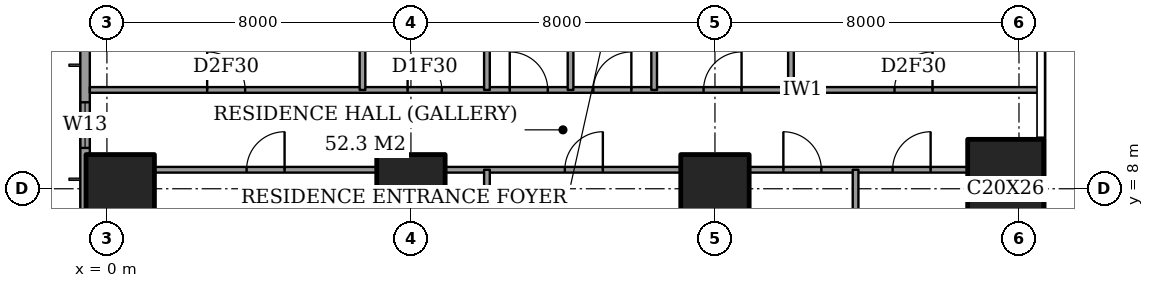
"""IFC4 building model, lengths in metres.
Left out: names, types, materials, properties, quantities, classifications, styles, units other than length and angle.
Written with IfcOpenShell. Run it as: python <this file> out.ifc"""

import sys

from ifc_helpers import new_model, si_unit, direction, frame, frame_2d, origin, origin_2d, place, context, subcontext, project, spatial, rectangle, extrude, element, fill, save


model = new_model("IFC4")
c1 = context("Model", 3, precision=1e-05, world=origin(), true_north=direction((0.0, 1.0)))
c2 = subcontext(c1, "Body", "Model", "MODEL_VIEW")
j1 = project(units=[si_unit("LENGTHUNIT", "METRE"), si_unit("PLANEANGLEUNIT", "RADIAN")], contexts=[c1])
p1 = place(None, origin())
s1 = spatial("IfcSite", under=j1, at=p1, CompositionType="ELEMENT")
p2 = place(p1, origin())
s2 = spatial("IfcBuilding", under=s1, at=p2, CompositionType="ELEMENT")
p3 = place(p2, frame((0.0, 0.0, 207.4)))
s3 = spatial("IfcBuildingStorey", under=s2, at=p3, CompositionType="ELEMENT", Elevation=207.4)
for number, where, z_axis, x_axis in (
    (1, (0.35, 8.0, 0.0), (0.0, 0.0, 1.0), (1.0, 0.0, 0.0)),
    (2, (8.0, 8.0, 0.0), (0.0, 0.0, 1.0), (1.0, 0.0, 0.0)),
    (3, (16.0, 8.0, 0.0), (0.0, 0.0, 1.0), (1.0, 0.0, 0.0)),
):
    element("IfcColumn", number, at=place(p3, frame(where, z_axis=z_axis, x_axis=x_axis)), inside=s3, PredefinedType="COLUMN", context=c2, shape_type="SweptSolid", body=[
        extrude(rectangle(XDim=1.8, YDim=1.8, at=origin_2d()), origin(), (0.0, 0.0, 1.0), 3.6),
    ])
p4 = place(p3, frame((23.65, 8.0, 0.0), z_axis=(0.0, 0.0, 1.0), x_axis=(1.0, 0.0, 0.0)))
e4 = element("IfcColumn", 4, at=p4, inside=s3, PredefinedType="COLUMN", context=c2, shape_type="SweptSolid", body=[
    extrude(rectangle(XDim=2.0, YDim=2.6, at=origin_2d()), origin(), (0.0, 0.0, 1.0), 3.6),
])
p5 = place(p3, frame((-0.575, 44.825, 0.0), z_axis=(0.0, 0.0, 1.0), x_axis=(0.0, -1.0, 0.0)))
e5 = element("IfcWall", 5, at=p5, inside=s3, PredefinedType="SOLIDWALL", context=c2, shape_type="SweptSolid", body=[
    extrude(rectangle(XDim=41.65, YDim=0.25, at=frame_2d((20.825, 0.0))), origin(), (0.0, 0.0, 1.0), 3.6),
])
p6 = place(p5, frame((0.825, 0.0, 0.2)))
e6 = element("IfcOpeningElement", 6, at=p6, cuts=e5, PredefinedType="OPENING", context=c2, shape_type="SweptSolid", body=[
    extrude(rectangle(XDim=2.4, YDim=2.4, at=frame_2d((1.2, 1.2))), frame((0.0, 0.135, 0.0), z_axis=(0.0, -1.0, 0.0), x_axis=(1.0, 0.0, 0.0)), (0.0, 0.0, 1.0), 0.27),
])
p7 = place(p5, frame((6.075, 0.0, 0.2)))
e7 = element("IfcOpeningElement", 7, at=p7, cuts=e5, PredefinedType="OPENING", context=c2, shape_type="SweptSolid", body=[
    extrude(rectangle(XDim=1.2, YDim=2.4, at=frame_2d((0.6, 1.2))), frame((0.0, 0.135, 0.0), z_axis=(0.0, -1.0, 0.0), x_axis=(1.0, 0.0, 0.0)), (0.0, 0.0, 1.0), 0.27),
])
p8 = place(p5, frame((8.575, 0.0, 0.2)))
e8 = element("IfcOpeningElement", 8, at=p8, cuts=e5, PredefinedType="OPENING", context=c2, shape_type="SweptSolid", body=[
    extrude(rectangle(XDim=2.4, YDim=2.4, at=frame_2d((1.2, 1.2))), frame((0.0, 0.135, 0.0), z_axis=(0.0, -1.0, 0.0), x_axis=(1.0, 0.0, 0.0)), (0.0, 0.0, 1.0), 0.27),
])
p9 = place(p5, frame((15.675, 0.0, 0.2)))
e9 = element("IfcOpeningElement", 9, at=p9, cuts=e5, PredefinedType="OPENING", context=c2, shape_type="SweptSolid", body=[
    extrude(rectangle(XDim=2.4, YDim=2.4, at=frame_2d((1.2, 1.2))), frame((0.0, 0.135, 0.0), z_axis=(0.0, -1.0, 0.0), x_axis=(1.0, 0.0, 0.0)), (0.0, 0.0, 1.0), 0.27),
])
p10 = place(p5, frame((23.575, 0.0, 0.2)))
e10 = element("IfcOpeningElement", 10, at=p10, cuts=e5, PredefinedType="OPENING", context=c2, shape_type="SweptSolid", body=[
    extrude(rectangle(XDim=2.4, YDim=2.4, at=frame_2d((1.2, 1.2))), frame((0.0, 0.135, 0.0), z_axis=(0.0, -1.0, 0.0), x_axis=(1.0, 0.0, 0.0)), (0.0, 0.0, 1.0), 0.27),
])
p11 = place(p5, frame((30.775, 0.0, 0.2)))
e11 = element("IfcOpeningElement", 11, at=p11, cuts=e5, PredefinedType="OPENING", context=c2, shape_type="SweptSolid", body=[
    extrude(rectangle(XDim=2.4, YDim=2.4, at=frame_2d((1.2, 1.2))), frame((0.0, 0.135, 0.0), z_axis=(0.0, -1.0, 0.0), x_axis=(1.0, 0.0, 0.0)), (0.0, 0.0, 1.0), 0.27),
])
p12 = place(p5, frame((34.55, 0.0, 0.2)))
e12 = element("IfcOpeningElement", 12, at=p12, cuts=e5, PredefinedType="OPENING", context=c2, shape_type="SweptSolid", body=[
    extrude(rectangle(XDim=1.2, YDim=2.4, at=frame_2d((0.6, 1.2))), frame((0.0, 0.135, 0.0), z_axis=(0.0, -1.0, 0.0), x_axis=(1.0, 0.0, 0.0)), (0.0, 0.0, 1.0), 0.27),
])
p13 = place(p5, frame((38.425, 0.0, 0.2)))
e13 = element("IfcOpeningElement", 13, at=p13, cuts=e5, PredefinedType="OPENING", context=c2, shape_type="SweptSolid", body=[
    extrude(rectangle(XDim=2.4, YDim=2.4, at=frame_2d((1.2, 1.2))), frame((0.0, 0.135, 0.0), z_axis=(0.0, -1.0, 0.0), x_axis=(1.0, 0.0, 0.0)), (0.0, 0.0, 1.0), 0.27),
])
p14 = place(p3, frame((1.25, 8.5, 0.0), z_axis=(0.0, 0.0, 1.0), x_axis=(1.0, 0.0, 0.0)))
e14 = element("IfcWall", 14, at=p14, inside=s3, PredefinedType="PARTITIONING", context=c2, shape_type="SweptSolid", body=[
    extrude(rectangle(XDim=5.85, YDim=0.15, at=frame_2d((2.925, 0.0))), origin(), (0.0, 0.0, 1.0), 3.35),
])
p15 = place(p14, frame((2.425, 0.0, 0.0)))
e15 = element("IfcOpeningElement", 15, at=p15, cuts=e14, PredefinedType="OPENING", context=c2, shape_type="SweptSolid", body=[
    extrude(rectangle(XDim=1.0, YDim=2.1, at=frame_2d((0.5, 1.05))), frame((0.0, 0.085, 0.0), z_axis=(0.0, -1.0, 0.0), x_axis=(1.0, 0.0, 0.0)), (0.0, 0.0, 1.0), 0.17),
])
p16 = place(p3, frame((8.9, 8.5, 0.0), z_axis=(0.0, 0.0, 1.0), x_axis=(1.0, 0.0, 0.0)))
e16 = element("IfcWall", 16, at=p16, inside=s3, PredefinedType="PARTITIONING", context=c2, shape_type="SweptSolid", body=[
    extrude(rectangle(XDim=6.2, YDim=0.15, at=frame_2d((3.1, 0.0))), origin(), (0.0, 0.0, 1.0), 3.35),
])
p17 = place(p16, frame((3.15, 0.0, 0.0)))
e17 = element("IfcOpeningElement", 17, at=p17, cuts=e16, PredefinedType="OPENING", context=c2, shape_type="SweptSolid", body=[
    extrude(rectangle(XDim=1.0, YDim=2.1, at=frame_2d((0.5, 1.05))), frame((0.0, 0.085, 0.0), z_axis=(0.0, -1.0, 0.0), x_axis=(1.0, 0.0, 0.0)), (0.0, 0.0, 1.0), 0.17),
])
p18 = place(p3, frame((16.9, 8.5, 0.0), z_axis=(0.0, 0.0, 1.0), x_axis=(1.0, 0.0, 0.0)))
e18 = element("IfcWall", 18, at=p18, inside=s3, PredefinedType="PARTITIONING", context=c2, shape_type="SweptSolid", body=[
    extrude(rectangle(XDim=5.75, YDim=0.15, at=frame_2d((2.875, 0.0))), origin(), (0.0, 0.0, 1.0), 3.35),
])
p19 = place(p18, frame((0.9, 0.0, 0.0)))
e19 = element("IfcOpeningElement", 19, at=p19, cuts=e18, PredefinedType="OPENING", context=c2, shape_type="SweptSolid", body=[
    extrude(rectangle(XDim=1.0, YDim=2.1, at=frame_2d((0.5, 1.05))), frame((0.0, 0.085, 0.0), z_axis=(0.0, -1.0, 0.0), x_axis=(1.0, 0.0, 0.0)), (0.0, 0.0, 1.0), 0.17),
])
p20 = place(p18, frame((3.775, 0.0, 0.0)))
e20 = element("IfcOpeningElement", 20, at=p20, cuts=e18, PredefinedType="OPENING", context=c2, shape_type="SweptSolid", body=[
    extrude(rectangle(XDim=1.0, YDim=2.1, at=frame_2d((0.5, 1.05))), frame((0.0, 0.085, 0.0), z_axis=(0.0, -1.0, 0.0), x_axis=(1.0, 0.0, 0.0)), (0.0, 0.0, 1.0), 0.17),
])
p21 = place(p3, frame((-0.45, 10.6, 0.0), z_axis=(0.0, 0.0, 1.0), x_axis=(1.0, 0.0, 0.0)))
e21 = element("IfcWall", 21, at=p21, inside=s3, PredefinedType="PARTITIONING", context=c2, shape_type="SweptSolid", body=[
    extrude(rectangle(XDim=25.011, YDim=0.15, at=frame_2d((12.505, 0.0))), origin(), (0.0, 0.0, 1.0), 3.35),
])
p22 = place(p21, frame((13.25, 0.0, 0.0)))
e22 = element("IfcOpeningElement", 22, at=p22, cuts=e21, PredefinedType="OPENING", context=c2, shape_type="SweptSolid", body=[
    extrude(rectangle(XDim=1.0, YDim=2.1, at=frame_2d((0.5, 1.05))), frame((0.0, 0.085, 0.0), z_axis=(0.0, -1.0, 0.0), x_axis=(1.0, 0.0, 0.0)), (0.0, 0.0, 1.0), 0.17),
])
p23 = place(p21, frame((3.087, 0.0, 0.0)))
e23 = element("IfcOpeningElement", 23, at=p23, cuts=e21, PredefinedType="OPENING", context=c2, shape_type="SweptSolid", body=[
    extrude(rectangle(XDim=1.0, YDim=2.1, at=frame_2d((0.5, 1.05))), frame((0.0, 0.085, 0.0), z_axis=(0.0, -1.0, 0.0), x_axis=(1.0, 0.0, 0.0)), (0.0, 0.0, 1.0), 0.17),
])
p24 = place(p21, frame((8.363, 0.0, 0.0)))
e24 = element("IfcOpeningElement", 24, at=p24, cuts=e21, PredefinedType="OPENING", context=c2, shape_type="SweptSolid", body=[
    extrude(rectangle(XDim=0.9, YDim=2.1, at=frame_2d((0.45, 1.05))), frame((0.0, 0.085, 0.0), z_axis=(0.0, -1.0, 0.0), x_axis=(1.0, 0.0, 0.0)), (0.0, 0.0, 1.0), 0.17),
])
p25 = place(p21, frame((11.05, 0.0, 0.0)))
e25 = element("IfcOpeningElement", 25, at=p25, cuts=e21, PredefinedType="OPENING", context=c2, shape_type="SweptSolid", body=[
    extrude(rectangle(XDim=1.0, YDim=2.1, at=frame_2d((0.5, 1.05))), frame((0.0, 0.085, 0.0), z_axis=(0.0, -1.0, 0.0), x_axis=(1.0, 0.0, 0.0)), (0.0, 0.0, 1.0), 0.17),
])
p26 = place(p21, frame((16.15, 0.0, 0.0)))
e26 = element("IfcOpeningElement", 26, at=p26, cuts=e21, PredefinedType="OPENING", context=c2, shape_type="SweptSolid", body=[
    extrude(rectangle(XDim=1.0, YDim=2.1, at=frame_2d((0.5, 1.05))), frame((0.0, 0.085, 0.0), z_axis=(0.0, -1.0, 0.0), x_axis=(1.0, 0.0, 0.0)), (0.0, 0.0, 1.0), 0.17),
])
p27 = place(p21, frame((21.175, 0.0, 0.0)))
e27 = element("IfcOpeningElement", 27, at=p27, cuts=e21, PredefinedType="OPENING", context=c2, shape_type="SweptSolid", body=[
    extrude(rectangle(XDim=1.0, YDim=2.1, at=frame_2d((0.5, 1.05))), frame((0.0, 0.085, 0.0), z_axis=(0.0, -1.0, 0.0), x_axis=(1.0, 0.0, 0.0)), (0.0, 0.0, 1.0), 0.17),
])
p28 = place(p3, frame((6.725, 10.6, 0.0), z_axis=(0.0, 0.0, 1.0), x_axis=(0.0, 1.0, 0.0)))
e28 = element("IfcWall", 28, at=p28, inside=s3, PredefinedType="PARTITIONING", context=c2, shape_type="SweptSolid", body=[
    extrude(rectangle(XDim=4.2, YDim=0.15, at=frame_2d((2.1, 0.0))), origin(), (0.0, 0.0, 1.0), 3.35),
])
p29 = place(p3, frame((10.0, -0.45, 0.0), z_axis=(0.0, 0.0, 1.0), x_axis=(0.0, 1.0, 0.0)))
e29 = element("IfcWall", 29, at=p29, inside=s3, PredefinedType="PARTITIONING", context=c2, shape_type="SweptSolid", body=[
    extrude(rectangle(XDim=8.95, YDim=0.15, at=frame_2d((4.475, 0.0))), origin(), (0.0, 0.0, 1.0), 3.35),
])
p30 = place(p3, frame((10.0, 10.6, 0.0), z_axis=(0.0, 0.0, 1.0), x_axis=(0.0, 1.0, 0.0)))
e30 = element("IfcWall", 30, at=p30, inside=s3, PredefinedType="PARTITIONING", context=c2, shape_type="SweptSolid", body=[
    extrude(rectangle(XDim=11.0, YDim=0.15, at=frame_2d((5.5, 0.0))), origin(), (0.0, 0.0, 1.0), 3.35),
])
p31 = place(p30, frame((8.2, 0.0, 0.0)))
e31 = element("IfcOpeningElement", 31, at=p31, cuts=e30, PredefinedType="OPENING", context=c2, shape_type="SweptSolid", body=[
    extrude(rectangle(XDim=1.0, YDim=2.1, at=frame_2d((0.5, 1.05))), frame((0.0, 0.085, 0.0), z_axis=(0.0, -1.0, 0.0), x_axis=(1.0, 0.0, 0.0)), (0.0, 0.0, 1.0), 0.17),
])
for number, where, z_axis, x_axis in (
    (32, (12.2, 10.6, 0.0), (0.0, 0.0, 1.0), (0.0, 1.0, 0.0)),
    (33, (14.4, 10.6, 0.0), (0.0, 0.0, 1.0), (0.0, 1.0, 0.0)),
    (34, (18.0, 10.6, 0.0), (0.0, 0.0, 1.0), (0.0, 1.0, 0.0)),
):
    element("IfcWall", number, at=place(p3, frame(where, z_axis=z_axis, x_axis=x_axis)), inside=s3, PredefinedType="PARTITIONING", context=c2, shape_type="SweptSolid", body=[
        extrude(rectangle(XDim=6.4, YDim=0.15, at=frame_2d((3.2, 0.0))), origin(), (0.0, 0.0, 1.0), 3.35),
    ])
p32 = place(p3, frame((19.7, -0.45, 0.0), z_axis=(0.0, 0.0, 1.0), x_axis=(0.0, 1.0, 0.0)))
e35 = element("IfcWall", 35, at=p32, inside=s3, PredefinedType="PARTITIONING", context=c2, shape_type="SweptSolid", body=[
    extrude(rectangle(XDim=8.95, YDim=0.15, at=frame_2d((4.475, 0.0))), origin(), (0.0, 0.0, 1.0), 3.35),
])
p33 = place(p12, origin())
e36 = element("IfcWindow", 36, at=p33, inside=s3, PartitioningType="SINGLE_PANEL", PredefinedType="WINDOW", context=c2, shape_type="SweptSolid", body=[
    extrude(rectangle(XDim=1.2, YDim=2.4, at=frame_2d((0.6, 1.2))), frame((0.0, 0.03, 0.0), z_axis=(0.0, -1.0, 0.0), x_axis=(1.0, 0.0, 0.0)), (0.0, 0.0, 1.0), 0.06),
])
fill(e12, e36)
p34 = place(p15, origin())
e37 = element("IfcDoor", 37, at=p34, inside=s3, OperationType="SINGLE_SWING_LEFT", PredefinedType="DOOR", context=c2, shape_type="SweptSolid", body=[
    extrude(rectangle(XDim=1.0, YDim=2.1, at=frame_2d((0.5, 1.05))), frame((0.0, 0.025, 0.0), z_axis=(0.0, -1.0, 0.0), x_axis=(1.0, 0.0, 0.0)), (0.0, 0.0, 1.0), 0.05),
])
fill(e15, e37)
p35 = place(p17, origin())
e38 = element("IfcDoor", 38, at=p35, inside=s3, OperationType="SINGLE_SWING_LEFT", PredefinedType="DOOR", context=c2, shape_type="SweptSolid", body=[
    extrude(rectangle(XDim=1.0, YDim=2.1, at=frame_2d((0.5, 1.05))), frame((0.0, 0.025, 0.0), z_axis=(0.0, -1.0, 0.0), x_axis=(1.0, 0.0, 0.0)), (0.0, 0.0, 1.0), 0.05),
])
fill(e17, e38)
p36 = place(p19, origin())
e39 = element("IfcDoor", 39, at=p36, inside=s3, OperationType="SINGLE_SWING_RIGHT", PredefinedType="DOOR", context=c2, shape_type="SweptSolid", body=[
    extrude(rectangle(XDim=1.0, YDim=2.1, at=frame_2d((0.5, 1.05))), frame((0.0, 0.025, 0.0), z_axis=(0.0, -1.0, 0.0), x_axis=(1.0, 0.0, 0.0)), (0.0, 0.0, 1.0), 0.05),
])
fill(e19, e39)
p37 = place(p20, origin())
e40 = element("IfcDoor", 40, at=p37, inside=s3, OperationType="SINGLE_SWING_LEFT", PredefinedType="DOOR", context=c2, shape_type="SweptSolid", body=[
    extrude(rectangle(XDim=1.0, YDim=2.1, at=frame_2d((0.5, 1.05))), frame((0.0, 0.025, 0.0), z_axis=(0.0, -1.0, 0.0), x_axis=(1.0, 0.0, 0.0)), (0.0, 0.0, 1.0), 0.05),
])
fill(e20, e40)
p38 = place(p22, origin())
e41 = element("IfcDoor", 41, at=p38, inside=s3, OperationType="SINGLE_SWING_LEFT", PredefinedType="DOOR", context=c2, shape_type="SweptSolid", body=[
    extrude(rectangle(XDim=1.0, YDim=2.1, at=frame_2d((0.5, 1.05))), frame((0.0, 0.025, 0.0), z_axis=(0.0, -1.0, 0.0), x_axis=(1.0, 0.0, 0.0)), (0.0, 0.0, 1.0), 0.05),
])
fill(e22, e41)
p39 = place(p23, origin())
e42 = element("IfcDoor", 42, at=p39, inside=s3, OperationType="SINGLE_SWING_RIGHT", PredefinedType="DOOR", context=c2, shape_type="SweptSolid", body=[
    extrude(rectangle(XDim=1.0, YDim=2.1, at=frame_2d((0.5, 1.05))), frame((0.0, 0.025, 0.0), z_axis=(0.0, -1.0, 0.0), x_axis=(1.0, 0.0, 0.0)), (0.0, 0.0, 1.0), 0.05),
])
fill(e23, e42)
p40 = place(p24, origin())
e43 = element("IfcDoor", 43, at=p40, inside=s3, OperationType="SINGLE_SWING_RIGHT", PredefinedType="DOOR", context=c2, shape_type="SweptSolid", body=[
    extrude(rectangle(XDim=0.9, YDim=2.1, at=frame_2d((0.45, 1.05))), frame((0.0, 0.025, 0.0), z_axis=(0.0, -1.0, 0.0), x_axis=(1.0, 0.0, 0.0)), (0.0, 0.0, 1.0), 0.05),
])
fill(e24, e43)
p41 = place(p25, origin())
e44 = element("IfcDoor", 44, at=p41, inside=s3, OperationType="SINGLE_SWING_RIGHT", PredefinedType="DOOR", context=c2, shape_type="SweptSolid", body=[
    extrude(rectangle(XDim=1.0, YDim=2.1, at=frame_2d((0.5, 1.05))), frame((0.0, 0.025, 0.0), z_axis=(0.0, -1.0, 0.0), x_axis=(1.0, 0.0, 0.0)), (0.0, 0.0, 1.0), 0.05),
])
fill(e25, e44)
p42 = place(p26, origin())
e45 = element("IfcDoor", 45, at=p42, inside=s3, OperationType="SINGLE_SWING_LEFT", PredefinedType="DOOR", context=c2, shape_type="SweptSolid", body=[
    extrude(rectangle(XDim=1.0, YDim=2.1, at=frame_2d((0.5, 1.05))), frame((0.0, 0.025, 0.0), z_axis=(0.0, -1.0, 0.0), x_axis=(1.0, 0.0, 0.0)), (0.0, 0.0, 1.0), 0.05),
])
fill(e26, e45)
p43 = place(p27, origin())
e46 = element("IfcDoor", 46, at=p43, inside=s3, OperationType="SINGLE_SWING_LEFT", PredefinedType="DOOR", context=c2, shape_type="SweptSolid", body=[
    extrude(rectangle(XDim=1.0, YDim=2.1, at=frame_2d((0.5, 1.05))), frame((0.0, 0.025, 0.0), z_axis=(0.0, -1.0, 0.0), x_axis=(1.0, 0.0, 0.0)), (0.0, 0.0, 1.0), 0.05),
])
fill(e27, e46)
save(model, sys.argv[1])
